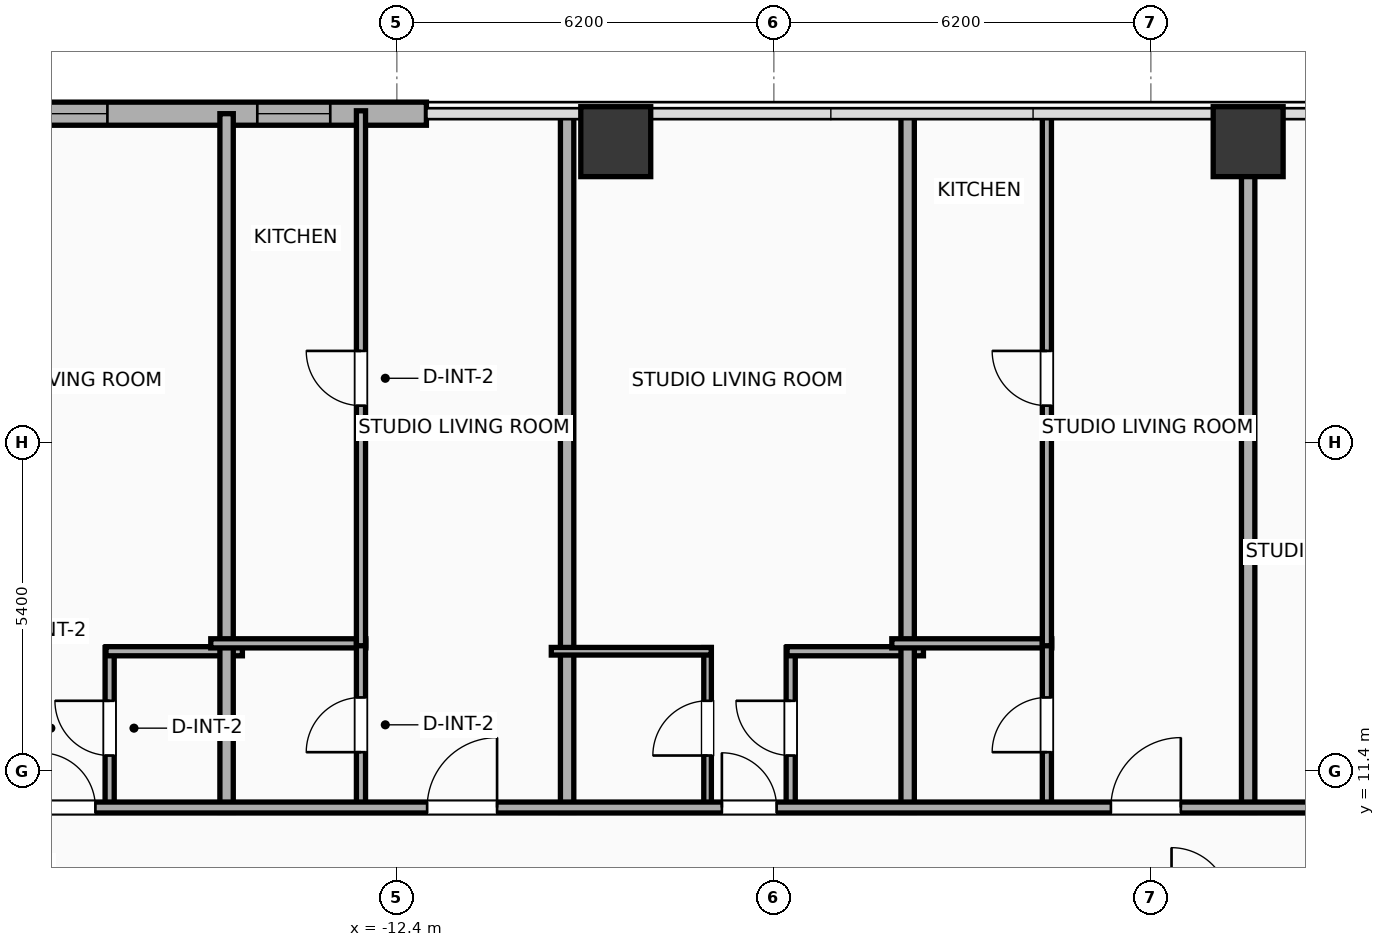
"""IFC4 building model, lengths in metres.
Left out: names, types, materials, properties, quantities, classifications, styles, units other than length and angle.
Written with IfcOpenShell. Run it as: python <this file> out.ifc"""

import sys

from ifc_helpers import new_model, si_unit, direction, frame, frame_2d, origin, origin_2d, place, context, subcontext, project, spatial, rectangle, hollow_rectangle, extrude, element, fill, save


model = new_model("IFC4")
c1 = context("Model", 3, precision=1e-05, world=origin(), true_north=direction((0.0, 1.0)))
c2 = subcontext(c1, "Body", "Model", "MODEL_VIEW")
j1 = project(units=[si_unit("LENGTHUNIT", "METRE"), si_unit("PLANEANGLEUNIT", "RADIAN")], contexts=[c1])
p1 = place(None, origin())
s1 = spatial("IfcSite", under=j1, at=p1, CompositionType="ELEMENT")
p2 = place(p1, origin())
s2 = spatial("IfcBuilding", under=s1, at=p2, CompositionType="ELEMENT")
p3 = place(p2, frame((0.0, 0.0, 61.1)))
s3 = spatial("IfcBuildingStorey", under=s2, at=p3, CompositionType="ELEMENT", Elevation=61.1)
for number, where, z_axis, x_axis in (
    (1, (1.6, 21.75, 0.0), (0.0, 0.0, 1.0), (1.0, 0.0, 0.0)),
    (2, (-8.8, 21.75, 0.0), (0.0, 0.0, 1.0), (1.0, 0.0, 0.0)),
):
    element("IfcColumn", number, at=place(p3, frame(where, z_axis=z_axis, x_axis=x_axis)), inside=s3, PredefinedType="COLUMN", context=c2, shape_type="SweptSolid", body=[
        extrude(hollow_rectangle(XDim=1.15, YDim=1.15, WallThickness=0.04, at=origin_2d()), origin(), (0.0, 0.0, 1.0), 3.9),
    ])
p4 = place(p3, frame((-29.581, 22.21, 0.0), z_axis=(0.0, 0.0, 1.0), x_axis=(1.0, 0.0, 0.0)))
e3 = element("IfcWall", 3, at=p4, inside=s3, PredefinedType="ELEMENTEDWALL", context=c2, shape_type="SweptSolid", body=[
    extrude(rectangle(XDim=17.667, YDim=0.38, at=frame_2d((8.833, 0.0))), origin(), (0.0, 0.0, 1.0), 3.65),
])
p5 = place(p4, frame((5.984, 0.0, 0.75)))
e4 = element("IfcOpeningElement", 4, at=p5, cuts=e3, PredefinedType="OPENING", context=c2, shape_type="SweptSolid", body=[
    extrude(rectangle(XDim=2.4, YDim=2.1, at=frame_2d((1.2, 1.05))), frame((0.0, 0.2, 0.0), z_axis=(0.0, -1.0, 0.0), x_axis=(1.0, 0.0, 0.0)), (0.0, 0.0, 1.0), 0.4),
])
p6 = place(p4, frame((1.436, 0.0, 0.75)))
e5 = element("IfcOpeningElement", 5, at=p6, cuts=e3, PredefinedType="OPENING", context=c2, shape_type="SweptSolid", body=[
    extrude(rectangle(XDim=1.2, YDim=2.05, at=frame_2d((0.6, 1.025))), frame((0.0, 0.2, 0.0), z_axis=(0.0, -1.0, 0.0), x_axis=(1.0, 0.0, 0.0)), (0.0, 0.0, 1.0), 0.4),
])
p7 = place(p4, frame((3.686, 0.0, 0.75)))
e6 = element("IfcOpeningElement", 6, at=p7, cuts=e3, PredefinedType="OPENING", context=c2, shape_type="SweptSolid", body=[
    extrude(rectangle(XDim=1.2, YDim=2.05, at=frame_2d((0.6, 1.025))), frame((0.0, 0.2, 0.0), z_axis=(0.0, -1.0, 0.0), x_axis=(1.0, 0.0, 0.0)), (0.0, 0.0, 1.0), 0.4),
])
p8 = place(p4, frame((11.221, 0.0, 0.75)))
e7 = element("IfcOpeningElement", 7, at=p8, cuts=e3, PredefinedType="OPENING", context=c2, shape_type="SweptSolid", body=[
    extrude(rectangle(XDim=1.2, YDim=2.05, at=frame_2d((0.6, 1.025))), frame((0.0, 0.2, 0.0), z_axis=(0.0, -1.0, 0.0), x_axis=(1.0, 0.0, 0.0)), (0.0, 0.0, 1.0), 0.4),
])
p9 = place(p4, frame((14.886, 0.0, 0.75)))
e8 = element("IfcOpeningElement", 8, at=p9, cuts=e3, PredefinedType="OPENING", context=c2, shape_type="SweptSolid", body=[
    extrude(rectangle(XDim=1.2, YDim=2.05, at=frame_2d((0.6, 1.025))), frame((0.0, 0.2, 0.0), z_axis=(0.0, -1.0, 0.0), x_axis=(1.0, 0.0, 0.0)), (0.0, 0.0, 1.0), 0.4),
])
p10 = place(p3, frame((-17.123, 10.78, 0.0), z_axis=(0.0, 0.0, 1.0), x_axis=(0.0, 1.0, 0.0)))
e9 = element("IfcWall", 9, at=p10, inside=s3, PredefinedType="PLUMBINGWALL", context=c2, shape_type="SweptSolid", body=[
    extrude(rectangle(XDim=2.65, YDim=0.15, at=frame_2d((1.325, 0.0))), origin(), (0.0, 0.0, 1.0), 3.65),
])
p11 = place(p10, frame((0.875, 0.0, 0.0)))
e10 = element("IfcOpeningElement", 10, at=p11, cuts=e9, PredefinedType="OPENING", context=c2, shape_type="SweptSolid", body=[
    extrude(rectangle(XDim=0.9, YDim=2.05, at=frame_2d((0.45, 1.025))), frame((0.0, 0.085, 0.0), z_axis=(0.0, -1.0, 0.0), x_axis=(1.0, 0.0, 0.0)), (0.0, 0.0, 1.0), 0.17),
])
p12 = place(p3, frame((-17.183, 13.37, 0.0), z_axis=(0.0, 0.0, 1.0), x_axis=(1.0, 0.0, 0.0)))
e11 = element("IfcWall", 11, at=p12, inside=s3, PredefinedType="PLUMBINGWALL", context=c2, shape_type="SweptSolid", body=[
    extrude(rectangle(XDim=2.243, YDim=0.15, at=frame_2d((1.122, 0.0))), origin(), (0.0, 0.0, 1.0), 3.65),
])
p13 = place(p3, frame((-15.2, 10.72, 0.0), z_axis=(0.0, 0.0, 1.0), x_axis=(0.0, 1.0, 0.0)))
e12 = element("IfcWall", 12, at=p13, inside=s3, PredefinedType="PARTITIONING", context=c2, shape_type="SweptSolid", body=[
    extrude(rectangle(XDim=11.49, YDim=0.22, at=frame_2d((5.745, 0.0))), origin(), (0.0, 0.0, 1.0), 3.65),
])
p14 = place(p3, frame((-15.46, 13.5, 0.0), z_axis=(0.0, 0.0, 1.0), x_axis=(1.0, 0.0, 0.0)))
e13 = element("IfcWall", 13, at=p14, inside=s3, PredefinedType="PLUMBINGWALL", context=c2, shape_type="SweptSolid", body=[
    extrude(rectangle(XDim=2.55, YDim=0.15, at=frame_2d((1.275, 0.0))), origin(), (0.0, 0.0, 1.0), 3.65),
])
p15 = place(p3, frame((-12.99, 10.78, 0.0), z_axis=(0.0, 0.0, 1.0), x_axis=(0.0, 1.0, 0.0)))
e14 = element("IfcWall", 14, at=p15, inside=s3, PredefinedType="PLUMBINGWALL", context=c2, shape_type="SweptSolid", body=[
    extrude(rectangle(XDim=2.76, YDim=0.15, at=frame_2d((1.38, 0.0))), origin(), (0.0, 0.0, 1.0), 3.65),
])
p16 = place(p15, frame((0.93, 0.0, 0.0)))
e15 = element("IfcOpeningElement", 15, at=p16, cuts=e14, PredefinedType="OPENING", context=c2, shape_type="SweptSolid", body=[
    extrude(rectangle(XDim=0.9, YDim=2.05, at=frame_2d((0.45, 1.025))), frame((0.0, 0.085, 0.0), z_axis=(0.0, -1.0, 0.0), x_axis=(1.0, 0.0, 0.0)), (0.0, 0.0, 1.0), 0.17),
])
p17 = place(p3, frame((-12.99, 13.46, 0.0), z_axis=(0.0, 0.0, 1.0), x_axis=(0.0, 1.0, 0.0)))
e16 = element("IfcWall", 16, at=p17, inside=s3, PredefinedType="PLUMBINGWALL", context=c2, shape_type="SweptSolid", body=[
    extrude(rectangle(XDim=8.798, YDim=0.15, at=frame_2d((4.399, 0.0))), origin(), (0.0, 0.0, 1.0), 3.65),
])
p18 = place(p17, frame((3.949, 0.0, 0.0)))
e17 = element("IfcOpeningElement", 17, at=p18, cuts=e16, PredefinedType="OPENING", context=c2, shape_type="SweptSolid", body=[
    extrude(rectangle(XDim=0.9, YDim=2.05, at=frame_2d((0.45, 1.025))), frame((0.0, 0.085, 0.0), z_axis=(0.0, -1.0, 0.0), x_axis=(1.0, 0.0, 0.0)), (0.0, 0.0, 1.0), 0.17),
])
p19 = place(p3, frame((-9.6, 10.72, 0.0), z_axis=(0.0, 0.0, 1.0), x_axis=(0.0, 1.0, 0.0)))
e18 = element("IfcWall", 18, at=p19, inside=s3, PredefinedType="PARTITIONING", context=c2, shape_type="SweptSolid", body=[
    extrude(rectangle(XDim=11.49, YDim=0.22, at=frame_2d((5.745, 0.0))), origin(), (0.0, 0.0, 1.0), 2.94),
])
p20 = place(p3, frame((-7.29, 10.78, 0.0), z_axis=(0.0, 0.0, 1.0), x_axis=(0.0, 1.0, 0.0)))
e19 = element("IfcWall", 19, at=p20, inside=s3, PredefinedType="PARTITIONING", context=c2, shape_type="SweptSolid", body=[
    extrude(rectangle(XDim=2.65, YDim=0.125, at=frame_2d((1.325, 0.0))), origin(), (0.0, 0.0, 1.0), 3.65),
])
p21 = place(p20, frame((0.875, 0.0, 0.0)))
e20 = element("IfcOpeningElement", 20, at=p21, cuts=e19, PredefinedType="OPENING", context=c2, shape_type="SweptSolid", body=[
    extrude(rectangle(XDim=0.9, YDim=2.05, at=frame_2d((0.45, 1.025))), frame((0.0, 0.073, 0.0), z_axis=(0.0, -1.0, 0.0), x_axis=(1.0, 0.0, 0.0)), (0.0, 0.0, 1.0), 0.145),
])
p22 = place(p3, frame((-5.923, 10.78, 0.0), z_axis=(0.0, 0.0, 1.0), x_axis=(0.0, 1.0, 0.0)))
e21 = element("IfcWall", 21, at=p22, inside=s3, PredefinedType="PLUMBINGWALL", context=c2, shape_type="SweptSolid", body=[
    extrude(rectangle(XDim=2.65, YDim=0.15, at=frame_2d((1.325, 0.0))), origin(), (0.0, 0.0, 1.0), 3.65),
])
p23 = place(p22, frame((0.875, 0.0, 0.0)))
e22 = element("IfcOpeningElement", 22, at=p23, cuts=e21, PredefinedType="OPENING", context=c2, shape_type="SweptSolid", body=[
    extrude(rectangle(XDim=0.9, YDim=2.05, at=frame_2d((0.45, 1.025))), frame((0.0, 0.085, 0.0), z_axis=(0.0, -1.0, 0.0), x_axis=(1.0, 0.0, 0.0)), (0.0, 0.0, 1.0), 0.17),
])
p24 = place(p3, frame((-9.86, 13.37, 0.0), z_axis=(0.0, 0.0, 1.0), x_axis=(1.0, 0.0, 0.0)))
e23 = element("IfcWall", 23, at=p24, inside=s3, PredefinedType="PARTITIONING", context=c2, shape_type="SweptSolid", body=[
    extrude(rectangle(XDim=2.63, YDim=0.125, at=frame_2d((1.315, 0.0))), origin(), (0.0, 0.0, 1.0), 3.65),
])
p25 = place(p3, frame((-5.983, 13.37, 0.0), z_axis=(0.0, 0.0, 1.0), x_axis=(1.0, 0.0, 0.0)))
e24 = element("IfcWall", 24, at=p25, inside=s3, PredefinedType="PLUMBINGWALL", context=c2, shape_type="SweptSolid", body=[
    extrude(rectangle(XDim=2.243, YDim=0.15, at=frame_2d((1.122, 0.0))), origin(), (0.0, 0.0, 1.0), 3.65),
])
p26 = place(p3, frame((-4.0, 10.72, 0.0), z_axis=(0.0, 0.0, 1.0), x_axis=(0.0, 1.0, 0.0)))
e25 = element("IfcWall", 25, at=p26, inside=s3, PredefinedType="PARTITIONING", context=c2, shape_type="SweptSolid", body=[
    extrude(rectangle(XDim=11.49, YDim=0.22, at=frame_2d((5.745, 0.0))), origin(), (0.0, 0.0, 1.0), 3.65),
])
p27 = place(p3, frame((-4.26, 13.5, 0.0), z_axis=(0.0, 0.0, 1.0), x_axis=(1.0, 0.0, 0.0)))
e26 = element("IfcWall", 26, at=p27, inside=s3, PredefinedType="PLUMBINGWALL", context=c2, shape_type="SweptSolid", body=[
    extrude(rectangle(XDim=2.63, YDim=0.15, at=frame_2d((1.315, 0.0))), origin(), (0.0, 0.0, 1.0), 3.65),
])
p28 = place(p3, frame((-1.71, 10.78, 0.0), z_axis=(0.0, 0.0, 1.0), x_axis=(0.0, 1.0, 0.0)))
e27 = element("IfcWall", 27, at=p28, inside=s3, PredefinedType="PLUMBINGWALL", context=c2, shape_type="SweptSolid", body=[
    extrude(rectangle(XDim=2.76, YDim=0.15, at=frame_2d((1.38, 0.0))), origin(), (0.0, 0.0, 1.0), 3.65),
])
p29 = place(p28, frame((0.93, 0.0, 0.0)))
e28 = element("IfcOpeningElement", 28, at=p29, cuts=e27, PredefinedType="OPENING", context=c2, shape_type="SweptSolid", body=[
    extrude(rectangle(XDim=0.9, YDim=2.05, at=frame_2d((0.45, 1.025))), frame((0.0, 0.085, 0.0), z_axis=(0.0, -1.0, 0.0), x_axis=(1.0, 0.0, 0.0)), (0.0, 0.0, 1.0), 0.17),
])
p30 = place(p3, frame((-1.71, 13.46, 0.0), z_axis=(0.0, 0.0, 1.0), x_axis=(0.0, 1.0, 0.0)))
e29 = element("IfcWall", 29, at=p30, inside=s3, PredefinedType="PLUMBINGWALL", context=c2, shape_type="SweptSolid", body=[
    extrude(rectangle(XDim=8.798, YDim=0.15, at=frame_2d((4.399, 0.0))), origin(), (0.0, 0.0, 1.0), 3.65),
])
p31 = place(p30, frame((3.949, 0.0, 0.0)))
e30 = element("IfcOpeningElement", 30, at=p31, cuts=e29, PredefinedType="OPENING", context=c2, shape_type="SweptSolid", body=[
    extrude(rectangle(XDim=0.9, YDim=2.05, at=frame_2d((0.45, 1.025))), frame((0.0, 0.085, 0.0), z_axis=(0.0, -1.0, 0.0), x_axis=(1.0, 0.0, 0.0)), (0.0, 0.0, 1.0), 0.17),
])
p32 = place(p3, frame((1.6, 10.72, 0.0), z_axis=(0.0, 0.0, 1.0), x_axis=(0.0, 1.0, 0.0)))
e31 = element("IfcWall", 31, at=p32, inside=s3, PredefinedType="PARTITIONING", context=c2, shape_type="SweptSolid", body=[
    extrude(rectangle(XDim=11.49, YDim=0.22, at=frame_2d((5.745, 0.0))), origin(), (0.0, 0.0, 1.0), 2.94),
])
p33 = place(p3, frame((-33.41, 10.8, 0.0), z_axis=(0.0, 0.0, 1.0), x_axis=(1.0, 0.0, 0.0)))
e32 = element("IfcWall", 32, at=p33, inside=s3, PredefinedType="PARTITIONING", context=c2, shape_type="SweptSolid", body=[
    extrude(rectangle(XDim=59.62, YDim=0.18, at=frame_2d((29.81, 0.0))), origin(), (0.0, 0.0, 1.0), 3.65),
])
p34 = place(p33, frame((3.062, 0.0, 0.0)))
e33 = element("IfcOpeningElement", 33, at=p34, cuts=e32, PredefinedType="OPENING", context=c2, shape_type="SweptSolid", body=[
    extrude(rectangle(XDim=1.15, YDim=2.05, at=frame_2d((0.575, 1.025))), frame((0.0, 0.1, 0.0), z_axis=(0.0, -1.0, 0.0), x_axis=(1.0, 0.0, 0.0)), (0.0, 0.0, 1.0), 0.2),
])
p35 = place(p33, frame((10.312, 0.0, 0.0)))
e34 = element("IfcOpeningElement", 34, at=p35, cuts=e32, PredefinedType="OPENING", context=c2, shape_type="SweptSolid", body=[
    extrude(rectangle(XDim=1.15, YDim=2.05, at=frame_2d((0.575, 1.025))), frame((0.0, 0.1, 0.0), z_axis=(0.0, -1.0, 0.0), x_axis=(1.0, 0.0, 0.0)), (0.0, 0.0, 1.0), 0.2),
])
p36 = place(p33, frame((15.153, 0.0, 0.0)))
e35 = element("IfcOpeningElement", 35, at=p36, cuts=e32, PredefinedType="OPENING", context=c2, shape_type="SweptSolid", body=[
    extrude(rectangle(XDim=0.9, YDim=2.05, at=frame_2d((0.45, 1.025))), frame((0.0, 0.1, 0.0), z_axis=(0.0, -1.0, 0.0), x_axis=(1.0, 0.0, 0.0)), (0.0, 0.0, 1.0), 0.2),
])
p37 = place(p33, frame((21.508, 0.0, 0.0)))
e36 = element("IfcOpeningElement", 36, at=p37, cuts=e32, PredefinedType="OPENING", context=c2, shape_type="SweptSolid", body=[
    extrude(rectangle(XDim=1.15, YDim=2.05, at=frame_2d((0.575, 1.025))), frame((0.0, 0.1, 0.0), z_axis=(0.0, -1.0, 0.0), x_axis=(1.0, 0.0, 0.0)), (0.0, 0.0, 1.0), 0.2),
])
p38 = place(p33, frame((26.355, 0.0, 0.0)))
e37 = element("IfcOpeningElement", 37, at=p38, cuts=e32, PredefinedType="OPENING", context=c2, shape_type="SweptSolid", body=[
    extrude(rectangle(XDim=0.9, YDim=2.05, at=frame_2d((0.45, 1.025))), frame((0.0, 0.1, 0.0), z_axis=(0.0, -1.0, 0.0), x_axis=(1.0, 0.0, 0.0)), (0.0, 0.0, 1.0), 0.2),
])
p39 = place(p33, frame((32.753, 0.0, 0.0)))
e38 = element("IfcOpeningElement", 38, at=p39, cuts=e32, PredefinedType="OPENING", context=c2, shape_type="SweptSolid", body=[
    extrude(rectangle(XDim=1.15, YDim=2.05, at=frame_2d((0.575, 1.025))), frame((0.0, 0.1, 0.0), z_axis=(0.0, -1.0, 0.0), x_axis=(1.0, 0.0, 0.0)), (0.0, 0.0, 1.0), 0.2),
])
p40 = place(p33, frame((36.163, 0.0, 0.0)))
e39 = element("IfcOpeningElement", 39, at=p40, cuts=e32, PredefinedType="OPENING", context=c2, shape_type="SweptSolid", body=[
    extrude(rectangle(XDim=1.15, YDim=2.05, at=frame_2d((0.575, 1.025))), frame((0.0, 0.1, 0.0), z_axis=(0.0, -1.0, 0.0), x_axis=(1.0, 0.0, 0.0)), (0.0, 0.0, 1.0), 0.2),
])
p41 = place(p33, frame((43.156, 0.0, 0.0)))
e40 = element("IfcOpeningElement", 40, at=p41, cuts=e32, PredefinedType="OPENING", context=c2, shape_type="SweptSolid", body=[
    extrude(rectangle(XDim=0.9, YDim=2.05, at=frame_2d((0.45, 1.025))), frame((0.0, 0.1, 0.0), z_axis=(0.0, -1.0, 0.0), x_axis=(1.0, 0.0, 0.0)), (0.0, 0.0, 1.0), 0.2),
])
p42 = place(p33, frame((47.36, 0.0, 0.0)))
e41 = element("IfcOpeningElement", 41, at=p42, cuts=e32, PredefinedType="OPENING", context=c2, shape_type="SweptSolid", body=[
    extrude(rectangle(XDim=1.15, YDim=2.05, at=frame_2d((0.575, 1.025))), frame((0.0, 0.1, 0.0), z_axis=(0.0, -1.0, 0.0), x_axis=(1.0, 0.0, 0.0)), (0.0, 0.0, 1.0), 0.2),
])
p43 = place(p33, frame((55.337, 0.0, 0.0)))
e42 = element("IfcOpeningElement", 42, at=p43, cuts=e32, PredefinedType="OPENING", context=c2, shape_type="SweptSolid", body=[
    extrude(rectangle(XDim=1.15, YDim=2.05, at=frame_2d((0.575, 1.025))), frame((0.0, 0.1, 0.0), z_axis=(0.0, -1.0, 0.0), x_axis=(1.0, 0.0, 0.0)), (0.0, 0.0, 1.0), 0.2),
])
p44 = place(p8, origin())
e43 = element("IfcWindow", 43, at=p44, inside=s3, PartitioningType="SINGLE_PANEL", PredefinedType="WINDOW", context=c2, shape_type="SweptSolid", body=[
    extrude(rectangle(XDim=1.2, YDim=2.05, at=frame_2d((0.6, 1.025))), frame((0.0, 0.03, 0.0), z_axis=(0.0, -1.0, 0.0), x_axis=(1.0, 0.0, 0.0)), (0.0, 0.0, 1.0), 0.06),
])
fill(e7, e43)
p45 = place(p9, origin())
e44 = element("IfcWindow", 44, at=p45, inside=s3, PartitioningType="SINGLE_PANEL", PredefinedType="WINDOW", context=c2, shape_type="SweptSolid", body=[
    extrude(rectangle(XDim=1.2, YDim=2.05, at=frame_2d((0.6, 1.025))), frame((0.0, 0.03, 0.0), z_axis=(0.0, -1.0, 0.0), x_axis=(1.0, 0.0, 0.0)), (0.0, 0.0, 1.0), 0.06),
])
fill(e8, e44)
p46 = place(p11, origin())
e45 = element("IfcDoor", 45, at=p46, inside=s3, OperationType="SINGLE_SWING_RIGHT", PredefinedType="DOOR", context=c2, shape_type="SweptSolid", body=[
    extrude(rectangle(XDim=0.9, YDim=2.05, at=frame_2d((0.45, 1.025))), frame((0.0, 0.025, 0.0), z_axis=(0.0, -1.0, 0.0), x_axis=(1.0, 0.0, 0.0)), (0.0, 0.0, 1.0), 0.05),
])
fill(e10, e45)
p47 = place(p16, origin())
e46 = element("IfcDoor", 46, at=p47, inside=s3, OperationType="SINGLE_SWING_LEFT", PredefinedType="DOOR", context=c2, shape_type="SweptSolid", body=[
    extrude(rectangle(XDim=0.9, YDim=2.05, at=frame_2d((0.45, 1.025))), frame((0.0, 0.025, 0.0), z_axis=(0.0, -1.0, 0.0), x_axis=(1.0, 0.0, 0.0)), (0.0, 0.0, 1.0), 0.05),
])
fill(e15, e46)
p48 = place(p18, origin())
e47 = element("IfcDoor", 47, at=p48, inside=s3, OperationType="SINGLE_SWING_RIGHT", PredefinedType="DOOR", context=c2, shape_type="SweptSolid", body=[
    extrude(rectangle(XDim=0.9, YDim=2.05, at=frame_2d((0.45, 1.025))), frame((0.0, 0.025, 0.0), z_axis=(0.0, -1.0, 0.0), x_axis=(1.0, 0.0, 0.0)), (0.0, 0.0, 1.0), 0.05),
])
fill(e17, e47)
p49 = place(p21, origin())
e48 = element("IfcDoor", 48, at=p49, inside=s3, OperationType="SINGLE_SWING_LEFT", PredefinedType="DOOR", context=c2, shape_type="SweptSolid", body=[
    extrude(rectangle(XDim=0.9, YDim=2.05, at=frame_2d((0.45, 1.025))), frame((0.0, 0.025, 0.0), z_axis=(0.0, -1.0, 0.0), x_axis=(1.0, 0.0, 0.0)), (0.0, 0.0, 1.0), 0.05),
])
fill(e20, e48)
p50 = place(p23, origin())
e49 = element("IfcDoor", 49, at=p50, inside=s3, OperationType="SINGLE_SWING_RIGHT", PredefinedType="DOOR", context=c2, shape_type="SweptSolid", body=[
    extrude(rectangle(XDim=0.9, YDim=2.05, at=frame_2d((0.45, 1.025))), frame((0.0, 0.025, 0.0), z_axis=(0.0, -1.0, 0.0), x_axis=(1.0, 0.0, 0.0)), (0.0, 0.0, 1.0), 0.05),
])
fill(e22, e49)
p51 = place(p29, origin())
e50 = element("IfcDoor", 50, at=p51, inside=s3, OperationType="SINGLE_SWING_LEFT", PredefinedType="DOOR", context=c2, shape_type="SweptSolid", body=[
    extrude(rectangle(XDim=0.9, YDim=2.05, at=frame_2d((0.45, 1.025))), frame((0.0, 0.025, 0.0), z_axis=(0.0, -1.0, 0.0), x_axis=(1.0, 0.0, 0.0)), (0.0, 0.0, 1.0), 0.05),
])
fill(e28, e50)
p52 = place(p31, origin())
e51 = element("IfcDoor", 51, at=p52, inside=s3, OperationType="SINGLE_SWING_RIGHT", PredefinedType="DOOR", context=c2, shape_type="SweptSolid", body=[
    extrude(rectangle(XDim=0.9, YDim=2.05, at=frame_2d((0.45, 1.025))), frame((0.0, 0.025, 0.0), z_axis=(0.0, -1.0, 0.0), x_axis=(1.0, 0.0, 0.0)), (0.0, 0.0, 1.0), 0.05),
])
fill(e30, e51)
p53 = place(p36, origin())
e52 = element("IfcDoor", 52, at=p53, inside=s3, OperationType="SINGLE_SWING_LEFT", PredefinedType="DOOR", context=c2, shape_type="SweptSolid", body=[
    extrude(rectangle(XDim=0.9, YDim=2.05, at=frame_2d((0.45, 1.025))), frame((0.0, 0.025, 0.0), z_axis=(0.0, -1.0, 0.0), x_axis=(1.0, 0.0, 0.0)), (0.0, 0.0, 1.0), 0.05),
])
fill(e35, e52)
p54 = place(p37, origin())
e53 = element("IfcDoor", 53, at=p54, inside=s3, OperationType="SINGLE_SWING_RIGHT", PredefinedType="DOOR", context=c2, shape_type="SweptSolid", body=[
    extrude(rectangle(XDim=1.15, YDim=2.05, at=frame_2d((0.575, 1.025))), frame((0.0, 0.025, 0.0), z_axis=(0.0, -1.0, 0.0), x_axis=(1.0, 0.0, 0.0)), (0.0, 0.0, 1.0), 0.05),
])
fill(e36, e53)
p55 = place(p38, origin())
e54 = element("IfcDoor", 54, at=p55, inside=s3, OperationType="SINGLE_SWING_LEFT", PredefinedType="DOOR", context=c2, shape_type="SweptSolid", body=[
    extrude(rectangle(XDim=0.9, YDim=2.05, at=frame_2d((0.45, 1.025))), frame((0.0, 0.025, 0.0), z_axis=(0.0, -1.0, 0.0), x_axis=(1.0, 0.0, 0.0)), (0.0, 0.0, 1.0), 0.05),
])
fill(e37, e54)
p56 = place(p39, origin())
e55 = element("IfcDoor", 55, at=p56, inside=s3, OperationType="SINGLE_SWING_RIGHT", PredefinedType="DOOR", context=c2, shape_type="SweptSolid", body=[
    extrude(rectangle(XDim=1.15, YDim=2.05, at=frame_2d((0.575, 1.025))), frame((0.0, 0.025, 0.0), z_axis=(0.0, -1.0, 0.0), x_axis=(1.0, 0.0, 0.0)), (0.0, 0.0, 1.0), 0.05),
])
fill(e38, e55)
save(model, sys.argv[1])
